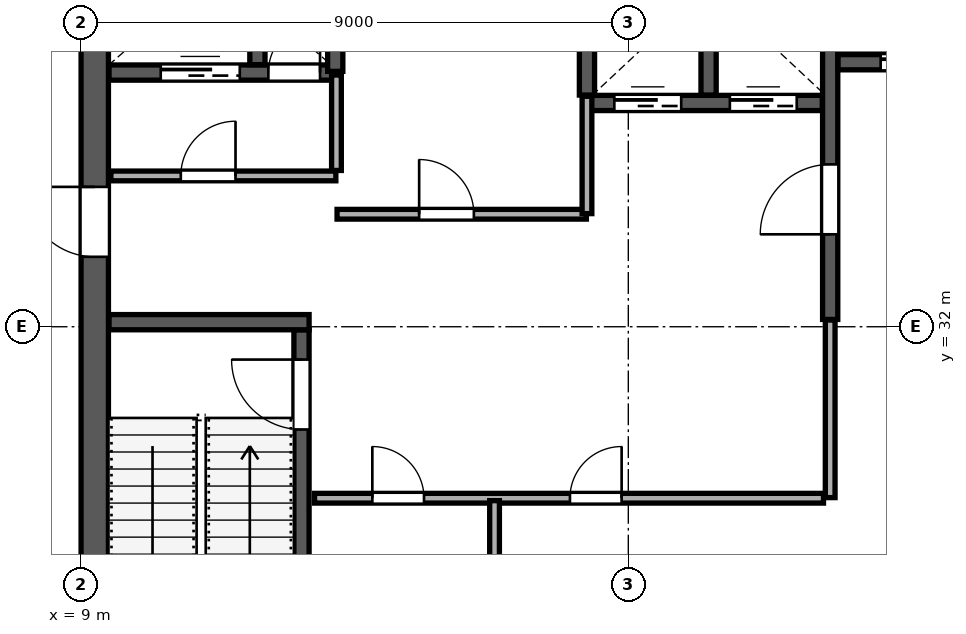
"""IFC4 building model, lengths in metres.
Left out: names, types, materials, properties, quantities, classifications, styles, units other than length and angle.
Written with IfcOpenShell. Run it as: python <this file> out.ifc"""

import sys

from ifc_helpers import new_model, si_unit, direction, frame, frame_2d, origin, place, context, subcontext, project, spatial, rectangle, extrude, source, transform, mapped, element, fill, save


model = new_model("IFC4")
c1 = context("Model", 3, precision=1e-05, world=origin(), true_north=direction((0.0, 1.0)))
c2 = subcontext(c1, "Body", "Model", "MODEL_VIEW")
j1 = project(units=[si_unit("LENGTHUNIT", "METRE"), si_unit("PLANEANGLEUNIT", "RADIAN")], contexts=[c1])
p1 = place(None, origin())
s1 = spatial("IfcSite", under=j1, at=p1, CompositionType="ELEMENT")
p2 = place(p1, origin())
s2 = spatial("IfcBuilding", under=s1, at=p2, CompositionType="ELEMENT")
p3 = place(p2, frame((0.0, 0.0, 224.8)))
s3 = spatial("IfcBuildingStorey", under=s2, at=p3, CompositionType="ELEMENT", Elevation=224.8)
p4 = place(p3, frame((9.225, 24.45, 0.0), z_axis=(0.0, 0.0, 1.0), x_axis=(0.0, 1.0, 0.0)))
e1 = element("IfcWall", 1, at=p4, inside=s3, PredefinedType="SHEAR", context=c2, shape_type="SweptSolid", body=[
    extrude(rectangle(XDim=15.1, YDim=0.45, at=frame_2d((7.55, 0.0))), origin(), (0.0, 0.0, 1.0), 3.96),
])
p5 = place(p4, frame((8.7, 0.0, 0.0)))
e2 = element("IfcOpeningElement", 2, at=p5, cuts=e1, PredefinedType="OPENING", context=c2, shape_type="SweptSolid", body=[
    extrude(rectangle(XDim=1.15, YDim=2.2, at=frame_2d((0.575, 1.1))), frame((0.0, 0.235, 0.0), z_axis=(0.0, -1.0, 0.0), x_axis=(1.0, 0.0, 0.0)), (0.0, 0.0, 1.0), 0.47),
])
p6 = place(p3, frame((12.625, 24.46, 0.0), z_axis=(0.0, 0.0, 1.0), x_axis=(0.0, 1.0, 0.0)))
e3 = element("IfcWall", 3, at=p6, inside=s3, PredefinedType="SHEAR", context=c2, shape_type="SweptSolid", body=[
    extrude(rectangle(XDim=7.49, YDim=0.25, at=frame_2d((3.745, 0.0))), origin(), (0.0, 0.0, 1.0), 3.96),
])
p7 = place(p6, frame((5.85, 0.0, 0.0)))
e4 = element("IfcOpeningElement", 4, at=p7, cuts=e3, PredefinedType="OPENING", context=c2, shape_type="SweptSolid", body=[
    extrude(rectangle(XDim=1.15, YDim=2.2, at=frame_2d((0.575, 1.1))), frame((0.0, 0.135, 0.0), z_axis=(0.0, -1.0, 0.0), x_axis=(1.0, 0.0, 0.0)), (0.0, 0.0, 1.0), 0.27),
])
p8 = place(p3, frame((9.46, 32.075, 0.0), z_axis=(0.0, 0.0, 1.0), x_axis=(1.0, 0.0, 0.0)))
e5 = element("IfcWall", 5, at=p8, inside=s3, PredefinedType="SHEAR", context=c2, shape_type="SweptSolid", body=[
    extrude(rectangle(XDim=3.29, YDim=0.25, at=frame_2d((1.645, 0.0))), origin(), (0.0, 0.0, 1.0), 3.96),
])
p9 = place(p3, frame((21.32, 32.12, 0.0), z_axis=(0.0, 0.0, 1.0), x_axis=(0.0, 1.0, 0.0)))
e6 = element("IfcWall", 6, at=p9, inside=s3, PredefinedType="SHEAR", context=c2, shape_type="SweptSolid", body=[
    extrude(rectangle(XDim=7.42, YDim=0.25, at=frame_2d((3.71, 0.0))), origin(), (0.0, 0.0, 1.0), 3.96),
])
p10 = place(p9, frame((1.4, 0.0, 0.0)))
e7 = element("IfcOpeningElement", 7, at=p10, cuts=e6, PredefinedType="OPENING", context=c2, shape_type="SweptSolid", body=[
    extrude(rectangle(XDim=1.15, YDim=2.2, at=frame_2d((0.575, 1.1))), frame((0.0, 0.135, 0.0), z_axis=(0.0, -1.0, 0.0), x_axis=(1.0, 0.0, 0.0)), (0.0, 0.0, 1.0), 0.27),
])
p11 = place(p3, frame((9.46, 36.18, 0.0), z_axis=(0.0, 0.0, 1.0), x_axis=(1.0, 0.0, 0.0)))
e8 = element("IfcWall", 8, at=p11, inside=s3, PredefinedType="SHEAR", context=c2, shape_type="SweptSolid", body=[
    extrude(rectangle(XDim=3.79, YDim=0.25, at=frame_2d((1.895, 0.0))), origin(), (0.0, 0.0, 1.0), 3.96),
])
p12 = place(p11, frame((2.62, 0.0, 0.0)))
e9 = element("IfcOpeningElement", 9, at=p12, cuts=e8, PredefinedType="OPENING", context=c2, shape_type="SweptSolid", body=[
    extrude(rectangle(XDim=0.85, YDim=2.1, at=frame_2d((0.425, 1.05))), frame((0.0, 0.135, 0.0), z_axis=(0.0, -1.0, 0.0), x_axis=(1.0, 0.0, 0.0)), (0.0, 0.0, 1.0), 0.27),
])
p13 = place(p11, frame((0.85, 0.0, 0.0)))
e10 = element("IfcOpeningElement", 10, at=p13, cuts=e8, PredefinedType="OPENING", context=c2, shape_type="SweptSolid", body=[
    extrude(rectangle(XDim=1.3, YDim=2.25, at=frame_2d((0.65, 1.125))), frame((0.0, 0.135, 0.0), z_axis=(0.0, -1.0, 0.0), x_axis=(1.0, 0.0, 0.0)), (0.0, 0.0, 1.0), 0.27),
])
p14 = place(p3, frame((11.9, 36.31, 0.0), z_axis=(0.0, 0.0, 1.0), x_axis=(0.0, 1.0, 0.0)))
e11 = element("IfcWall", 11, at=p14, inside=s3, PredefinedType="SHEAR", context=c2, shape_type="SweptSolid", body=[
    extrude(rectangle(XDim=3.23, YDim=0.25, at=frame_2d((1.615, 0.0))), origin(), (0.0, 0.0, 1.0), 3.96),
])
p15 = place(p3, frame((21.45, 36.35, 0.0), z_axis=(0.0, 0.0, 1.0), x_axis=(1.0, 0.0, 0.0)))
e12 = element("IfcWall", 12, at=p15, inside=s3, PredefinedType="SHEAR", context=c2, shape_type="SweptSolid", body=[
    extrude(rectangle(XDim=5.09, YDim=0.25, at=frame_2d((2.545, 0.0))), origin(), (0.0, 0.0, 1.0), 3.96),
])
p16 = place(p15, frame((0.7, 0.0, 0.0)))
e13 = element("IfcOpeningElement", 13, at=p16, cuts=e12, PredefinedType="OPENING", context=c2, shape_type="SweptSolid", body=[
    extrude(rectangle(XDim=1.2, YDim=2.2, at=frame_2d((0.6, 1.1))), frame((0.0, 0.135, 0.0), z_axis=(0.0, -1.0, 0.0), x_axis=(1.0, 0.0, 0.0)), (0.0, 0.0, 1.0), 0.27),
])
p17 = place(p15, frame((3.25, 0.0, 0.0)))
e14 = element("IfcOpeningElement", 14, at=p17, cuts=e12, PredefinedType="OPENING", context=c2, shape_type="SweptSolid", body=[
    extrude(rectangle(XDim=1.2, YDim=2.2, at=frame_2d((0.6, 1.1))), frame((0.0, 0.135, 0.0), z_axis=(0.0, -1.0, 0.0), x_axis=(1.0, 0.0, 0.0)), (0.0, 0.0, 1.0), 0.27),
])
p18 = place(p3, frame((13.18, 36.2, 0.0), z_axis=(0.0, 0.0, 1.0), x_axis=(0.0, 1.0, 0.0)))
e15 = element("IfcWall", 15, at=p18, inside=s3, PredefinedType="SHEAR", context=c2, shape_type="SweptSolid", body=[
    extrude(rectangle(XDim=3.34, YDim=0.25, at=frame_2d((1.67, 0.0))), origin(), (0.0, 0.0, 1.0), 3.96),
])
p19 = place(p3, frame((17.32, 35.68, 0.0), z_axis=(0.0, 0.0, 1.0), x_axis=(1.0, 0.0, 0.0)))
e16 = element("IfcWall", 16, at=p19, inside=s3, PredefinedType="SHEAR", context=c2, shape_type="SweptSolid", body=[
    extrude(rectangle(XDim=3.87, YDim=0.25, at=frame_2d((1.935, 0.0))), origin(), (0.0, 0.0, 1.0), 3.96),
])
p20 = place(p19, frame((0.45, 0.0, 0.0)))
e17 = element("IfcOpeningElement", 17, at=p20, cuts=e16, PredefinedType="OPENING", context=c2, shape_type="SweptSolid", body=[
    extrude(rectangle(XDim=1.1, YDim=2.2, at=frame_2d((0.55, 1.1))), frame((0.0, 0.135, 0.0), z_axis=(0.0, -1.0, 0.0), x_axis=(1.0, 0.0, 0.0)), (0.0, 0.0, 1.0), 0.27),
])
p21 = place(p19, frame((2.35, 0.0, 0.0)))
e18 = element("IfcOpeningElement", 18, at=p21, cuts=e16, PredefinedType="OPENING", context=c2, shape_type="SweptSolid", body=[
    extrude(rectangle(XDim=1.1, YDim=2.2, at=frame_2d((0.55, 1.1))), frame((0.0, 0.135, 0.0), z_axis=(0.0, -1.0, 0.0), x_axis=(1.0, 0.0, 0.0)), (0.0, 0.0, 1.0), 0.27),
])
for number, where, z_axis, x_axis in (
    (19, (17.32, 35.81, 0.0), (0.0, 0.0, 1.0), (0.0, 1.0, 0.0)),
    (20, (19.32, 35.81, 0.0), (0.0, 0.0, 1.0), (0.0, 1.0, 0.0)),
):
    element("IfcWall", number, at=place(p3, frame(where, z_axis=z_axis, x_axis=x_axis)), inside=s3, PredefinedType="SHEAR", context=c2, shape_type="SweptSolid", body=[
        extrude(rectangle(XDim=3.73, YDim=0.25, at=frame_2d((1.865, 0.0))), origin(), (0.0, 0.0, 1.0), 3.96),
    ])
p22 = place(p3, frame((9.49, 34.48, 0.0), z_axis=(0.0, 0.0, 1.0), x_axis=(1.0, 0.0, 0.0)))
e21 = element("IfcWall", 21, at=p22, inside=s3, PredefinedType="PARTITIONING", context=c2, shape_type="SweptSolid", body=[
    extrude(rectangle(XDim=3.7, YDim=0.16, at=frame_2d((1.85, 0.0))), origin(), (0.0, 0.0, 1.0), 3.96),
])
p23 = place(p22, frame((1.15, 0.0, 0.0)))
e22 = element("IfcOpeningElement", 22, at=p23, cuts=e21, PredefinedType="OPENING", context=c2, shape_type="SweptSolid", body=[
    extrude(rectangle(XDim=0.9, YDim=2.15, at=frame_2d((0.45, 1.075))), frame((0.0, 0.09, 0.0), z_axis=(0.0, -1.0, 0.0), x_axis=(1.0, 0.0, 0.0)), (0.0, 0.0, 1.0), 0.18),
])
p24 = place(p3, frame((13.2, 34.57, 0.0), z_axis=(0.0, 0.0, 1.0), x_axis=(0.0, 1.0, 0.0)))
e23 = element("IfcWall", 23, at=p24, inside=s3, PredefinedType="PARTITIONING", context=c2, shape_type="SweptSolid", body=[
    extrude(rectangle(XDim=1.57, YDim=0.16, at=frame_2d((0.785, 0.0))), origin(), (0.0, 0.0, 1.0), 3.96),
])
p25 = place(p3, frame((13.21, 33.85, 0.0), z_axis=(0.0, 0.0, 1.0), x_axis=(1.0, 0.0, 0.0)))
e24 = element("IfcWall", 24, at=p25, inside=s3, PredefinedType="PARTITIONING", context=c2, shape_type="SweptSolid", body=[
    extrude(rectangle(XDim=4.1, YDim=0.16, at=frame_2d((2.05, 0.0))), origin(), (0.0, 0.0, 1.0), 3.96),
])
p26 = place(p25, frame((1.35, 0.0, 0.0)))
e25 = element("IfcOpeningElement", 25, at=p26, cuts=e24, PredefinedType="OPENING", context=c2, shape_type="SweptSolid", body=[
    extrude(rectangle(XDim=0.9, YDim=2.15, at=frame_2d((0.45, 1.075))), frame((0.0, 0.09, 0.0), z_axis=(0.0, -1.0, 0.0), x_axis=(1.0, 0.0, 0.0)), (0.0, 0.0, 1.0), 0.18),
])
p27 = place(p3, frame((17.32, 33.86, 0.0), z_axis=(0.0, 0.0, 1.0), x_axis=(0.0, 1.0, 0.0)))
e26 = element("IfcWall", 26, at=p27, inside=s3, PredefinedType="PARTITIONING", context=c2, shape_type="SweptSolid", body=[
    extrude(rectangle(XDim=1.93, YDim=0.16, at=frame_2d((0.965, 0.0))), origin(), (0.0, 0.0, 1.0), 3.96),
])
p28 = place(p3, frame((12.84, 29.18, 0.0), z_axis=(0.0, 0.0, 1.0), x_axis=(1.0, 0.0, 0.0)))
e27 = element("IfcWall", 27, at=p28, inside=s3, PredefinedType="PARTITIONING", context=c2, shape_type="SweptSolid", body=[
    extrude(rectangle(XDim=8.37, YDim=0.16, at=frame_2d((4.185, 0.0))), origin(), (0.0, 0.0, 1.0), 3.96),
])
p29 = place(p28, frame((0.95, 0.0, 0.0)))
e28 = element("IfcOpeningElement", 28, at=p29, cuts=e27, PredefinedType="OPENING", context=c2, shape_type="SweptSolid", body=[
    extrude(rectangle(XDim=0.85, YDim=2.1, at=frame_2d((0.425, 1.05))), frame((0.0, 0.09, 0.0), z_axis=(0.0, -1.0, 0.0), x_axis=(1.0, 0.0, 0.0)), (0.0, 0.0, 1.0), 0.18),
])
p30 = place(p28, frame((4.2, 0.0, 0.0)))
e29 = element("IfcOpeningElement", 29, at=p30, cuts=e27, PredefinedType="OPENING", context=c2, shape_type="SweptSolid", body=[
    extrude(rectangle(XDim=0.85, YDim=2.1, at=frame_2d((0.425, 1.05))), frame((0.0, 0.09, 0.0), z_axis=(0.0, -1.0, 0.0), x_axis=(1.0, 0.0, 0.0)), (0.0, 0.0, 1.0), 0.18),
])
p31 = place(p3, frame((15.8, 24.54, 0.0), z_axis=(0.0, 0.0, 1.0), x_axis=(0.0, 1.0, 0.0)))
e30 = element("IfcWall", 30, at=p31, inside=s3, PredefinedType="PARTITIONING", context=c2, shape_type="SweptSolid", body=[
    extrude(rectangle(XDim=4.6, YDim=0.16, at=frame_2d((2.3, 0.0))), origin(), (0.0, 0.0, 1.0), 3.96),
])
p32 = place(p3, frame((21.32, 29.19, 0.0), z_axis=(0.0, 0.0, 1.0), x_axis=(0.0, 1.0, 0.0)))
e31 = element("IfcWall", 31, at=p32, inside=s3, PredefinedType="PARTITIONING", context=c2, shape_type="SweptSolid", body=[
    extrude(rectangle(XDim=2.92, YDim=0.16, at=frame_2d((1.46, 0.0))), origin(), (0.0, 0.0, 1.0), 3.96),
])
p33 = place(p3, frame((16.416, 50.848, 0.0), z_axis=(0.0, 0.0, 1.0), x_axis=(0.766043174175, -0.642789121951, 0.0)))
e32 = element("IfcWall", 32, at=p33, inside=s3, PredefinedType="PARTITIONING", context=c2, shape_type="SweptSolid", body=[
    extrude(rectangle(XDim=22.27, YDim=0.1, at=frame_2d((11.135, 0.0))), origin(), (0.0, 0.0, 1.0), 3.96),
])
p34 = place(p33, frame((1.05, 0.0, 0.0)))
e33 = element("IfcOpeningElement", 33, at=p34, cuts=e32, PredefinedType="OPENING", context=c2, shape_type="SweptSolid", body=[
    extrude(rectangle(XDim=0.95, YDim=2.15, at=frame_2d((0.475, 1.075))), frame((0.0, 0.06, 0.0), z_axis=(0.0, -1.0, 0.0), x_axis=(1.0, 0.0, 0.0)), (0.0, 0.0, 1.0), 0.12),
])
p35 = place(p33, frame((9.8, 0.0, 0.0)))
e34 = element("IfcOpeningElement", 34, at=p35, cuts=e32, PredefinedType="OPENING", context=c2, shape_type="SweptSolid", body=[
    extrude(rectangle(XDim=0.95, YDim=2.15, at=frame_2d((0.475, 1.075))), frame((0.0, 0.06, 0.0), z_axis=(0.0, -1.0, 0.0), x_axis=(1.0, 0.0, 0.0)), (0.0, 0.0, 1.0), 0.12),
])
p36 = place(p3, frame((0.894, 32.412, 0.0), z_axis=(0.0, 0.0, 1.0), x_axis=(0.642782006196, 0.766049144971, 0.0)))
e35 = element("IfcWall", 35, at=p36, inside=s3, PredefinedType="PARTITIONING", context=c2, shape_type="SweptSolid", body=[
    extrude(rectangle(XDim=28.95, YDim=0.1, at=frame_2d((14.475, 0.0))), origin(), (0.0, 0.0, 1.0), 3.96),
])
p37 = place(p36, frame((2.2, 0.0, 0.0)))
e36 = element("IfcOpeningElement", 36, at=p37, cuts=e35, PredefinedType="OPENING", context=c2, shape_type="SweptSolid", body=[
    extrude(rectangle(XDim=0.95, YDim=2.15, at=frame_2d((0.475, 1.075))), frame((0.0, 0.06, 0.0), z_axis=(0.0, -1.0, 0.0), x_axis=(1.0, 0.0, 0.0)), (0.0, 0.0, 1.0), 0.12),
])
m1 = source(origin(), c2, "Body", "SweptSolid", [
    extrude(rectangle(XDim=1.15, YDim=2.2, at=frame_2d((0.575, 1.1))), frame((0.0, 0.025, 0.0), z_axis=(0.0, -1.0, 0.0), x_axis=(1.0, 0.0, 0.0)), (0.0, 0.0, 1.0), 0.05),
])
p38 = place(p7, origin())
e37 = element("IfcDoor", 37, at=p38, inside=s3, OperationType="SINGLE_SWING_RIGHT", PredefinedType="DOOR", context=c2, shape_type="MappedRepresentation", body=[
    mapped(m1, transform((0.0, 0.0, 0.0), scale=1.0)),
])
fill(e4, e37)
m2 = source(origin(), c2, "Body", "SweptSolid", [
    extrude(rectangle(XDim=1.15, YDim=2.2, at=frame_2d((0.575, 1.1))), frame((0.0, 0.025, 0.0), z_axis=(0.0, -1.0, 0.0), x_axis=(1.0, 0.0, 0.0)), (0.0, 0.0, 1.0), 0.05),
])
p39 = place(p10, origin())
e38 = element("IfcDoor", 38, at=p39, inside=s3, OperationType="SINGLE_SWING_LEFT", PredefinedType="DOOR", context=c2, shape_type="MappedRepresentation", body=[
    mapped(m2, transform((0.0, 0.0, 0.0), scale=1.0)),
])
fill(e7, e38)
p40 = place(p5, origin())
e39 = element("IfcDoor", 39, at=p40, inside=s3, OperationType="SINGLE_SWING_RIGHT", PredefinedType="DOOR", context=c2, shape_type="MappedRepresentation", body=[
    mapped(m2, transform((0.0, 0.0, 0.0), scale=1.0)),
])
fill(e2, e39)
m3 = source(origin(), c2, "Body", "SweptSolid", [
    extrude(rectangle(XDim=0.85, YDim=2.1, at=frame_2d((0.425, 1.05))), frame((0.0, 0.025, 0.0), z_axis=(0.0, -1.0, 0.0), x_axis=(1.0, 0.0, 0.0)), (0.0, 0.0, 1.0), 0.05),
])
p41 = place(p12, origin())
e40 = element("IfcDoor", 40, at=p41, inside=s3, OperationType="SINGLE_SWING_RIGHT", PredefinedType="DOOR", context=c2, shape_type="MappedRepresentation", body=[
    mapped(m3, transform((0.0, 0.0, 0.0), scale=1.0)),
])
fill(e9, e40)
m4 = source(origin(), c2, "Body", "SweptSolid", [
    extrude(rectangle(XDim=1.1, YDim=2.2, at=frame_2d((0.55, 1.1))), frame((0.0, 0.025, 0.0), z_axis=(0.0, -1.0, 0.0), x_axis=(1.0, 0.0, 0.0)), (0.0, 0.0, 1.0), 0.05),
])
p42 = place(p20, origin())
e41 = element("IfcDoor", 41, at=p42, inside=s3, OperationType="SLIDING_TO_LEFT", PredefinedType="DOOR", context=c2, shape_type="MappedRepresentation", body=[
    mapped(m4, transform((0.0, 0.0, 0.0), scale=1.0)),
])
fill(e17, e41)
p43 = place(p21, origin())
e42 = element("IfcDoor", 42, at=p43, inside=s3, OperationType="SLIDING_TO_RIGHT", PredefinedType="DOOR", context=c2, shape_type="MappedRepresentation", body=[
    mapped(m4, transform((0.0, 0.0, 0.0), scale=1.0)),
])
fill(e18, e42)
m5 = source(origin(), c2, "Body", "SweptSolid", [
    extrude(rectangle(XDim=1.2, YDim=2.2, at=frame_2d((0.6, 1.1))), frame((0.0, 0.025, 0.0), z_axis=(0.0, -1.0, 0.0), x_axis=(1.0, 0.0, 0.0)), (0.0, 0.0, 1.0), 0.05),
])
p44 = place(p16, origin())
e43 = element("IfcDoor", 43, at=p44, inside=s3, OperationType="SLIDING_TO_LEFT", PredefinedType="DOOR", context=c2, shape_type="MappedRepresentation", body=[
    mapped(m5, transform((0.0, 0.0, 0.0), scale=1.0)),
])
fill(e13, e43)
m6 = source(origin(), c2, "Body", "SweptSolid", [
    extrude(rectangle(XDim=1.3, YDim=2.25, at=frame_2d((0.65, 1.125))), frame((0.0, 0.025, 0.0), z_axis=(0.0, -1.0, 0.0), x_axis=(1.0, 0.0, 0.0)), (0.0, 0.0, 1.0), 0.05),
])
p45 = place(p13, origin())
e44 = element("IfcDoor", 44, at=p45, inside=s3, OperationType="SLIDING_TO_LEFT", PredefinedType="DOOR", context=c2, shape_type="MappedRepresentation", body=[
    mapped(m6, transform((0.0, 0.0, 0.0), scale=1.0)),
])
fill(e10, e44)
m7 = source(origin(), c2, "Body", "SweptSolid", [
    extrude(rectangle(XDim=0.9, YDim=2.15, at=frame_2d((0.45, 1.075))), frame((0.0, 0.025, 0.0), z_axis=(0.0, -1.0, 0.0), x_axis=(1.0, 0.0, 0.0)), (0.0, 0.0, 1.0), 0.05),
])
p46 = place(p23, origin())
e45 = element("IfcDoor", 45, at=p46, inside=s3, OperationType="SINGLE_SWING_RIGHT", PredefinedType="DOOR", context=c2, shape_type="MappedRepresentation", body=[
    mapped(m7, transform((0.0, 0.0, 0.0), scale=1.0)),
])
fill(e22, e45)
p47 = place(p26, origin())
e46 = element("IfcDoor", 46, at=p47, inside=s3, OperationType="SINGLE_SWING_LEFT", PredefinedType="DOOR", context=c2, shape_type="MappedRepresentation", body=[
    mapped(m7, transform((0.0, 0.0, 0.0), scale=1.0)),
])
fill(e25, e46)
p48 = place(p29, origin())
e47 = element("IfcDoor", 47, at=p48, inside=s3, OperationType="SINGLE_SWING_LEFT", PredefinedType="DOOR", context=c2, shape_type="MappedRepresentation", body=[
    mapped(m3, transform((0.0, 0.0, 0.0), scale=1.0)),
])
fill(e28, e47)
p49 = place(p30, origin())
e48 = element("IfcDoor", 48, at=p49, inside=s3, OperationType="SINGLE_SWING_RIGHT", PredefinedType="DOOR", context=c2, shape_type="MappedRepresentation", body=[
    mapped(m3, transform((0.0, 0.0, 0.0), scale=1.0)),
])
fill(e29, e48)
save(model, sys.argv[1])
